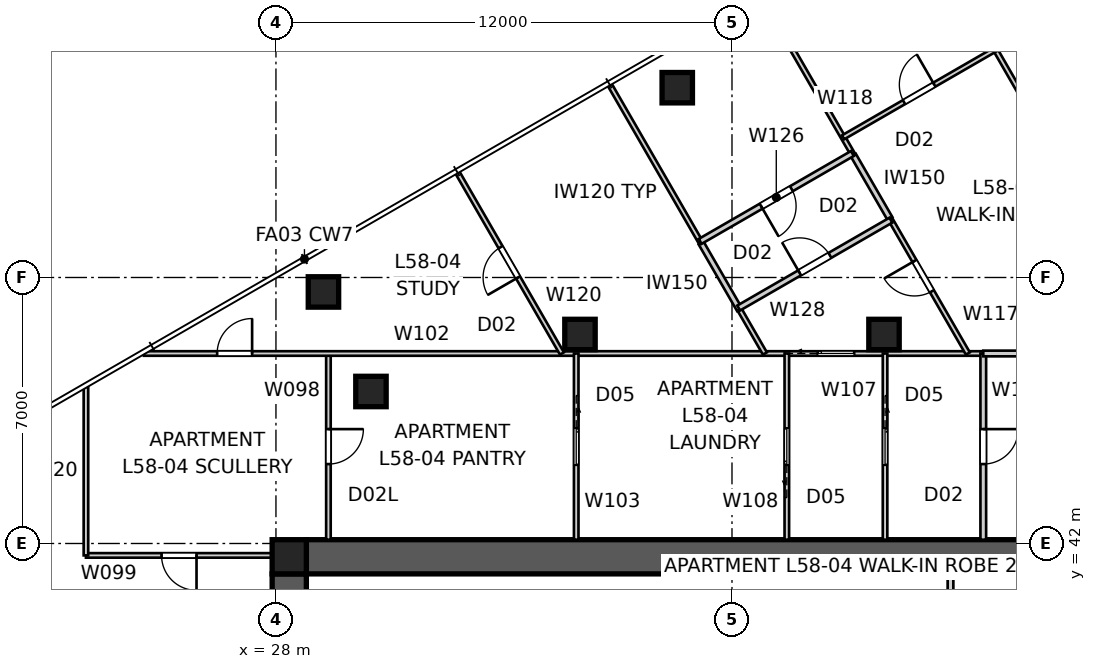
"""IFC4 building model, lengths in metres.
Left out: names, types, materials, properties, quantities, classifications, styles, units other than length and angle.
Written with IfcOpenShell. Run it as: python <this file> out.ifc"""

import sys

from ifc_helpers import new_model, si_unit, direction, frame, frame_2d, origin, origin_2d, place, context, subcontext, project, spatial, polyline, rectangle, outline, extrude, element, fill, save


model = new_model("IFC4")
c1 = context("Model", 3, precision=1e-05, world=origin(), true_north=direction((0.0, 1.0)))
c2 = subcontext(c1, "Body", "Model", "MODEL_VIEW")
j1 = project(units=[si_unit("LENGTHUNIT", "METRE"), si_unit("PLANEANGLEUNIT", "RADIAN")], contexts=[c1])
p1 = place(None, origin())
s1 = spatial("IfcSite", under=j1, at=p1, CompositionType="ELEMENT")
p2 = place(p1, origin())
s2 = spatial("IfcBuilding", under=s1, at=p2, CompositionType="ELEMENT")
p3 = place(p2, frame((0.0, 0.0, 211.6)))
s3 = spatial("IfcBuildingStorey", under=s2, at=p3, CompositionType="ELEMENT", Elevation=211.6)
p4 = place(p3, frame((28.8, 41.65, 0.0), z_axis=(0.0, 0.0, 1.0), x_axis=(1.0, 0.0, 0.0)))
e1 = element("IfcWall", 1, at=p4, inside=s3, PredefinedType="SHEAR", context=c2, shape_type="SweptSolid", body=[
    extrude(outline(polyline([(0.0, -0.45), (22.4, -0.45), (22.4, -0.025), (22.85, -0.025), (22.85, 0.025), (22.4, 0.025), (22.4, 0.45), (0.0, 0.45), (0.0, 0.025), (-0.45, 0.025), (-0.45, -0.025), (0.0, -0.025), (0.0, -0.45)])), origin(), (0.0, 0.0, 1.0), 3.4),
])
p5 = place(p3, frame((28.35, 41.2, 0.0), z_axis=(0.0, 0.0, 1.0), x_axis=(0.0, -1.0, 0.0)))
e2 = element("IfcWall", 2, at=p5, inside=s3, PredefinedType="SHEAR", context=c2, shape_type="SweptSolid", body=[
    extrude(outline(polyline([(0.0, -0.45), (22.4, -0.45), (22.4, -0.025), (22.85, -0.025), (22.85, 0.025), (22.4, 0.025), (22.4, 0.45), (0.0, 0.45), (0.0, 0.025), (-0.45, 0.025), (-0.45, -0.025), (0.0, -0.025), (0.0, -0.45)])), origin(), (0.0, 0.0, 1.0), 3.4),
])
p6 = place(p5, frame((11.14, 0.0, 0.0)))
e3 = element("IfcOpeningElement", 3, at=p6, cuts=e2, PredefinedType="OPENING", context=c2, shape_type="SweptSolid", body=[
    extrude(rectangle(XDim=1.02, YDim=2.4, at=frame_2d((0.51, 1.2))), frame((0.0, 0.46, 0.0), z_axis=(0.0, -1.0, 0.0), x_axis=(1.0, 0.0, 0.0)), (0.0, 0.0, 1.0), 0.92),
])
p7 = place(p3, frame((28.35, 41.65, 0.0), z_axis=(0.0, 0.0, 1.0), x_axis=(1.0, 0.0, 0.0)))
e4 = element("IfcColumn", 4, at=p7, inside=s3, PredefinedType="COLUMN", context=c2, shape_type="SweptSolid", body=[
    extrude(rectangle(XDim=0.9, YDim=0.9, at=origin_2d()), origin(), (0.0, 0.0, 1.0), 3.4),
])
for number, where, z_axis, x_axis in (
    (5, (38.56, 53.995, 0.0), (0.0, 0.0, 1.0), (1.0, 0.0, 0.0)),
    (6, (29.25, 48.62, 0.0), (0.0, 0.0, 1.0), (1.0, 0.0, 0.0)),
    (7, (44.0, 47.5, 0.0), (0.0, 0.0, 1.0), (1.0, 0.0, 0.0)),
    (8, (36.0, 47.5, 0.0), (0.0, 0.0, 1.0), (1.0, 0.0, 0.0)),
    (9, (30.5, 46.0, 0.0), (0.0, 0.0, 1.0), (1.0, 0.0, 0.0)),
):
    element("IfcColumn", number, at=place(p3, frame(where, z_axis=z_axis, x_axis=x_axis)), inside=s3, PredefinedType="COLUMN", context=c2, shape_type="SweptSolid", body=[
        extrude(rectangle(XDim=0.8, YDim=0.8, at=origin_2d()), origin(), (0.0, 0.0, 1.0), 3.4),
    ])
p8 = place(p3, frame((45.75, 41.2, 0.0), z_axis=(0.0, 0.0, 1.0), x_axis=(0.0, -1.0, 0.0)))
e10 = element("IfcWall", 10, at=p8, inside=s3, PredefinedType="SOLIDWALL", context=c2, shape_type="SweptSolid", body=[
    extrude(rectangle(XDim=5.9, YDim=0.15, at=frame_2d((2.95, 0.0))), origin(), (0.0, 0.0, 1.0), 3.25),
])
p9 = place(p3, frame((29.381, 47.0, 0.0), z_axis=(0.0, 0.0, 1.0), x_axis=(0.0, -1.0, 0.0)))
e11 = element("IfcWall", 11, at=p9, inside=s3, PredefinedType="PARTITIONING", context=c2, shape_type="SweptSolid", body=[
    extrude(rectangle(XDim=4.9, YDim=0.12, at=frame_2d((2.45, 0.0))), origin(), (0.0, 0.0, 1.0), 3.25),
])
p10 = place(p9, frame((1.99, 0.0, 0.0)))
e12 = element("IfcOpeningElement", 12, at=p10, cuts=e11, PredefinedType="OPENING", context=c2, shape_type="SweptSolid", body=[
    extrude(rectangle(XDim=0.92, YDim=2.1, at=frame_2d((0.46, 1.05))), frame((0.0, 0.07, 0.0), z_axis=(0.0, -1.0, 0.0), x_axis=(1.0, 0.0, 0.0)), (0.0, 0.0, 1.0), 0.14),
])
p11 = place(p3, frame((27.9, 41.687, 0.0), z_axis=(0.0, 0.0, 1.0), x_axis=(-1.0, 0.0, 0.0)))
e13 = element("IfcWall", 13, at=p11, inside=s3, PredefinedType="PARTITIONING", context=c2, shape_type="SweptSolid", body=[
    extrude(rectangle(XDim=4.9, YDim=0.12, at=frame_2d((2.45, 0.0))), origin(), (0.0, 0.0, 1.0), 3.25),
])
p12 = place(p11, frame((1.99, 0.0, 0.0)))
e14 = element("IfcOpeningElement", 14, at=p12, cuts=e13, PredefinedType="OPENING", context=c2, shape_type="SweptSolid", body=[
    extrude(rectangle(XDim=0.92, YDim=2.1, at=frame_2d((0.46, 1.05))), frame((0.0, 0.07, 0.0), z_axis=(0.0, -1.0, 0.0), x_axis=(1.0, 0.0, 0.0)), (0.0, 0.0, 1.0), 0.14),
])
p13 = place(p3, frame((23.0, 41.687, 0.0), z_axis=(0.0, 0.0, 1.0), x_axis=(0.0, 1.0, 0.0)))
e15 = element("IfcWall", 15, at=p13, inside=s3, PredefinedType="PARTITIONING", context=c2, shape_type="SweptSolid", body=[
    extrude(rectangle(XDim=4.433, YDim=0.12, at=frame_2d((2.216, 0.0))), origin(), (0.0, 0.0, 1.0), 3.25),
])
p14 = place(p3, frame((24.525, 47.0, 0.0), z_axis=(0.0, 0.0, 1.0), x_axis=(1.0, 0.0, 0.0)))
e16 = element("IfcWall", 16, at=p14, inside=s3, PredefinedType="PARTITIONING", context=c2, shape_type="SweptSolid", body=[
    extrude(rectangle(XDim=22.087, YDim=0.12, at=frame_2d((11.044, 0.0))), origin(), (0.0, 0.0, 1.0), 2.55),
])
p15 = place(p14, frame((1.928, 0.0, 0.0)))
e17 = element("IfcOpeningElement", 17, at=p15, cuts=e16, PredefinedType="OPENING", context=c2, shape_type="SweptSolid", body=[
    extrude(rectangle(XDim=0.92, YDim=2.34, at=frame_2d((0.46, 1.17))), frame((0.0, 0.07, 0.0), z_axis=(0.0, -1.0, 0.0), x_axis=(1.0, 0.0, 0.0)), (0.0, 0.0, 1.0), 0.14),
])
p16 = place(p14, frame((17.73, 0.0, 0.0)))
e18 = element("IfcOpeningElement", 18, at=p16, cuts=e16, PredefinedType="OPENING", context=c2, shape_type="SweptSolid", body=[
    extrude(rectangle(XDim=0.96, YDim=2.1, at=frame_2d((0.48, 1.05))), frame((0.0, 0.07, 0.0), z_axis=(0.0, -1.0, 0.0), x_axis=(1.0, 0.0, 0.0)), (0.0, 0.0, 1.0), 0.14),
])
p17 = place(p3, frame((35.901, 47.0, 0.0), z_axis=(0.0, 0.0, 1.0), x_axis=(0.0, -1.0, 0.0)))
e19 = element("IfcWall", 19, at=p17, inside=s3, PredefinedType="PARTITIONING", context=c2, shape_type="SweptSolid", body=[
    extrude(rectangle(XDim=4.9, YDim=0.12, at=frame_2d((2.45, 0.0))), origin(), (0.0, 0.0, 1.0), 3.25),
])
p18 = place(p17, frame((1.97, 0.0, 0.0)))
e20 = element("IfcOpeningElement", 20, at=p18, cuts=e19, PredefinedType="OPENING", context=c2, shape_type="SweptSolid", body=[
    extrude(rectangle(XDim=0.96, YDim=2.1, at=frame_2d((0.48, 1.05))), frame((0.0, 0.07, 0.0), z_axis=(0.0, -1.0, 0.0), x_axis=(1.0, 0.0, 0.0)), (0.0, 0.0, 1.0), 0.14),
])
p19 = place(p3, frame((44.028, 47.0, 0.0), z_axis=(0.0, 0.0, 1.0), x_axis=(0.0, -1.0, 0.0)))
e21 = element("IfcWall", 21, at=p19, inside=s3, PredefinedType="PARTITIONING", context=c2, shape_type="SweptSolid", body=[
    extrude(rectangle(XDim=4.9, YDim=0.12, at=frame_2d((2.45, 0.0))), origin(), (0.0, 0.0, 1.0), 3.25),
])
p20 = place(p19, frame((1.97, 0.0, 0.0)))
e22 = element("IfcOpeningElement", 22, at=p20, cuts=e21, PredefinedType="OPENING", context=c2, shape_type="SweptSolid", body=[
    extrude(rectangle(XDim=0.96, YDim=2.1, at=frame_2d((0.48, 1.05))), frame((0.0, 0.07, 0.0), z_axis=(0.0, -1.0, 0.0), x_axis=(1.0, 0.0, 0.0)), (0.0, 0.0, 1.0), 0.14),
])
p21 = place(p3, frame((41.443, 42.1, 0.0), z_axis=(0.0, 0.0, 1.0), x_axis=(0.0, 1.0, 0.0)))
e23 = element("IfcWall", 23, at=p21, inside=s3, PredefinedType="PARTITIONING", context=c2, shape_type="SweptSolid", body=[
    extrude(rectangle(XDim=4.9, YDim=0.12, at=frame_2d((2.45, 0.0))), origin(), (0.0, 0.0, 1.0), 3.25),
])
p22 = place(p21, frame((1.97, 0.0, 0.0)))
e24 = element("IfcOpeningElement", 24, at=p22, cuts=e23, PredefinedType="OPENING", context=c2, shape_type="SweptSolid", body=[
    extrude(rectangle(XDim=0.96, YDim=2.1, at=frame_2d((0.48, 1.05))), frame((0.0, 0.07, 0.0), z_axis=(0.0, -1.0, 0.0), x_axis=(1.0, 0.0, 0.0)), (0.0, 0.0, 1.0), 0.14),
])
p23 = place(p3, frame((46.612, 47.0, 0.0), z_axis=(0.0, 0.0, 1.0), x_axis=(0.0, -1.0, 0.0)))
e25 = element("IfcWall", 25, at=p23, inside=s3, PredefinedType="SOLIDWALL", context=c2, shape_type="SweptSolid", body=[
    extrude(rectangle(XDim=4.9, YDim=0.15, at=frame_2d((2.45, 0.0))), origin(), (0.0, 0.0, 1.0), 3.25),
])
p24 = place(p23, frame((1.99, 0.0, 0.0)))
e26 = element("IfcOpeningElement", 26, at=p24, cuts=e25, PredefinedType="OPENING", context=c2, shape_type="SweptSolid", body=[
    extrude(rectangle(XDim=0.92, YDim=2.34, at=frame_2d((0.46, 1.17))), frame((0.0, 0.085, 0.0), z_axis=(0.0, -1.0, 0.0), x_axis=(1.0, 0.0, 0.0)), (0.0, 0.0, 1.0), 0.17),
])
p25 = place(p3, frame((46.612, 47.0, 0.0), z_axis=(0.0, 0.0, 1.0), x_axis=(1.0, 0.0, 0.0)))
e27 = element("IfcWall", 27, at=p25, inside=s3, PredefinedType="SOLIDWALL", context=c2, shape_type="SweptSolid", body=[
    extrude(rectangle(XDim=2.585, YDim=0.15, at=frame_2d((1.292, 0.0))), origin(), (0.0, 0.0, 1.0), 3.25),
])
p26 = place(p3, frame((43.193, 52.219, 0.0), z_axis=(0.0, 0.0, 1.0), x_axis=(-0.50000634465, 0.866021740668, 0.0)))
e28 = element("IfcWall", 28, at=p26, inside=s3, PredefinedType="PARTITIONING", context=c2, shape_type="SweptSolid", body=[
    extrude(rectangle(XDim=4.814, YDim=0.12, at=frame_2d((2.407, 0.0))), origin(), (0.0, 0.0, 1.0), 3.25),
])
p27 = place(p3, frame((46.792, 55.237, 0.0), z_axis=(0.0, 0.0, 1.0), x_axis=(0.49923620881, -0.866465929978, 0.0)))
e29 = element("IfcWall", 29, at=p27, inside=s3, PredefinedType="PARTITIONING", context=c2, shape_type="SweptSolid", body=[
    extrude(rectangle(XDim=9.506, YDim=0.12, at=frame_2d((4.753, 0.0))), origin(), (0.0, 0.0, 1.0), 3.25),
])
p28 = place(p27, frame((6.586, 0.0, 0.0)))
e30 = element("IfcOpeningElement", 30, at=p28, cuts=e29, PredefinedType="OPENING", context=c2, shape_type="SweptSolid", body=[
    extrude(rectangle(XDim=0.92, YDim=2.34, at=frame_2d((0.46, 1.17))), frame((0.0, 0.07, 0.0), z_axis=(0.0, -1.0, 0.0), x_axis=(1.0, 0.0, 0.0)), (0.0, 0.0, 1.0), 0.14),
])
p29 = place(p27, frame((1.969, 0.0, 0.0)))
e31 = element("IfcOpeningElement", 31, at=p29, cuts=e29, PredefinedType="OPENING", context=c2, shape_type="SweptSolid", body=[
    extrude(rectangle(XDim=0.92, YDim=2.34, at=frame_2d((0.46, 1.17))), frame((0.0, 0.07, 0.0), z_axis=(0.0, -1.0, 0.0), x_axis=(1.0, 0.0, 0.0)), (0.0, 0.0, 1.0), 0.14),
])
p30 = place(p3, frame((46.207, 47.0, 0.0), z_axis=(0.0, 0.0, 1.0), x_axis=(-0.499986975689, 0.866032923243, 0.0)))
e32 = element("IfcWall", 32, at=p30, inside=s3, PredefinedType="PARTITIONING", context=c2, shape_type="SweptSolid", body=[
    extrude(rectangle(XDim=4.101, YDim=0.12, at=frame_2d((2.051, 0.0))), origin(), (0.0, 0.0, 1.0), 3.25),
])
p31 = place(p30, frame((1.891, 0.0, 0.0)))
e33 = element("IfcOpeningElement", 33, at=p31, cuts=e32, PredefinedType="OPENING", context=c2, shape_type="SweptSolid", body=[
    extrude(rectangle(XDim=0.92, YDim=2.34, at=frame_2d((0.46, 1.17))), frame((0.0, 0.07, 0.0), z_axis=(0.0, -1.0, 0.0), x_axis=(1.0, 0.0, 0.0)), (0.0, 0.0, 1.0), 0.14),
])
p32 = place(p3, frame((42.922, 52.688, 0.0), z_axis=(0.0, 0.0, 1.0), x_axis=(0.866025598446, 0.499999662836, 0.0)))
e34 = element("IfcWall", 34, at=p32, inside=s3, PredefinedType="PARTITIONING", context=c2, shape_type="SweptSolid", body=[
    extrude(rectangle(XDim=4.625, YDim=0.12, at=frame_2d((2.312, 0.0))), origin(), (0.0, 0.0, 1.0), 3.25),
])
p33 = place(p32, frame((1.853, 0.0, 0.0)))
e35 = element("IfcOpeningElement", 35, at=p33, cuts=e34, PredefinedType="OPENING", context=c2, shape_type="SweptSolid", body=[
    extrude(rectangle(XDim=0.92, YDim=2.34, at=frame_2d((0.46, 1.17))), frame((0.0, 0.07, 0.0), z_axis=(0.0, -1.0, 0.0), x_axis=(1.0, 0.0, 0.0)), (0.0, 0.0, 1.0), 0.14),
])
p34 = place(p3, frame((44.156, 50.552, 0.0), z_axis=(0.0, 0.0, 1.0), x_axis=(-0.50001143954, 0.866018799062, 0.0)))
e36 = element("IfcWall", 36, at=p34, inside=s3, PredefinedType="SOLIDWALL", context=c2, shape_type="SweptSolid", body=[
    extrude(rectangle(XDim=1.926, YDim=0.15, at=frame_2d((0.963, 0.0))), origin(), (0.0, 0.0, 1.0), 3.25),
])
p35 = place(p3, frame((35.526, 47.0, 0.0), z_axis=(0.0, 0.0, 1.0), x_axis=(-0.500010615962, 0.866019274569, 0.0)))
e37 = element("IfcWall", 37, at=p35, inside=s3, PredefinedType="PARTITIONING", context=c2, shape_type="SweptSolid", body=[
    extrude(rectangle(XDim=5.5, YDim=0.12, at=frame_2d((2.75, 0.0))), origin(), (0.0, 0.0, 1.0), 3.25),
])
p36 = place(p35, frame((2.31, 0.0, 0.0)))
e38 = element("IfcOpeningElement", 38, at=p36, cuts=e37, PredefinedType="OPENING", context=c2, shape_type="SweptSolid", body=[
    extrude(rectangle(XDim=0.92, YDim=2.34, at=frame_2d((0.46, 1.17))), frame((0.0, 0.07, 0.0), z_axis=(0.0, -1.0, 0.0), x_axis=(1.0, 0.0, 0.0)), (0.0, 0.0, 1.0), 0.14),
])
p37 = place(p3, frame((36.781, 54.076, 0.0), z_axis=(0.0, 0.0, 1.0), x_axis=(0.50000634465, -0.866021740668, 0.0)))
e39 = element("IfcWall", 39, at=p37, inside=s3, PredefinedType="PARTITIONING", context=c2, shape_type="SweptSolid", body=[
    extrude(rectangle(XDim=4.814, YDim=0.12, at=frame_2d((2.407, 0.0))), origin(), (0.0, 0.0, 1.0), 3.25),
])
p38 = place(p3, frame((40.2, 48.153, 0.0), z_axis=(0.0, 0.0, 1.0), x_axis=(0.500045314201, -0.865999240038, 0.0)))
e40 = element("IfcWall", 40, at=p38, inside=s3, PredefinedType="PARTITIONING", context=c2, shape_type="SweptSolid", body=[
    extrude(rectangle(XDim=1.331, YDim=0.12, at=frame_2d((0.666, 0.0))), origin(), (0.0, 0.0, 1.0), 3.25),
])
p39 = place(p3, frame((39.188, 49.907, 0.0), z_axis=(0.0, 0.0, 1.0), x_axis=(0.499924156672, -0.866069187523, 0.0)))
e41 = element("IfcWall", 41, at=p39, inside=s3, PredefinedType="SOLIDWALL", context=c2, shape_type="SweptSolid", body=[
    extrude(rectangle(XDim=2.026, YDim=0.15, at=frame_2d((1.013, 0.0))), origin(), (0.0, 0.0, 1.0), 3.25),
])
p40 = place(p3, frame((43.168, 52.263, 0.0), z_axis=(0.0, 0.0, 1.0), x_axis=(-0.866025598446, -0.499999662836, 0.0)))
e42 = element("IfcWall", 42, at=p40, inside=s3, PredefinedType="SOLIDWALL", context=c2, shape_type="SweptSolid", body=[
    extrude(rectangle(XDim=4.625, YDim=0.15, at=frame_2d((2.312, 0.0))), origin(), (0.0, 0.0, 1.0), 3.25),
])
p41 = place(p40, frame((1.853, 0.0, 0.0)))
e43 = element("IfcOpeningElement", 43, at=p41, cuts=e42, PredefinedType="OPENING", context=c2, shape_type="SweptSolid", body=[
    extrude(rectangle(XDim=0.92, YDim=2.34, at=frame_2d((0.46, 1.17))), frame((0.0, 0.085, 0.0), z_axis=(0.0, -1.0, 0.0), x_axis=(1.0, 0.0, 0.0)), (0.0, 0.0, 1.0), 0.17),
])
p42 = place(p3, frame((40.176, 48.196, 0.0), z_axis=(0.0, 0.0, 1.0), x_axis=(0.866025598446, 0.499999662836, 0.0)))
e44 = element("IfcWall", 44, at=p42, inside=s3, PredefinedType="SOLIDWALL", context=c2, shape_type="SweptSolid", body=[
    extrude(rectangle(XDim=4.625, YDim=0.15, at=frame_2d((2.312, 0.0))), origin(), (0.0, 0.0, 1.0), 3.25),
])
p43 = place(p42, frame((1.853, 0.0, 0.0)))
e45 = element("IfcOpeningElement", 45, at=p43, cuts=e44, PredefinedType="OPENING", context=c2, shape_type="SweptSolid", body=[
    extrude(rectangle(XDim=0.92, YDim=2.34, at=frame_2d((0.46, 1.17))), frame((0.0, 0.085, 0.0), z_axis=(0.0, -1.0, 0.0), x_axis=(1.0, 0.0, 0.0)), (0.0, 0.0, 1.0), 0.17),
])
p44 = place(p3, frame((27.9, 41.687, 0.0), z_axis=(0.0, 0.0, 1.0), x_axis=(0.999162409553, -0.040920402453, 0.0)))
e46 = element("IfcWall", 46, at=p44, inside=s3, PredefinedType="PARTITIONING", context=c2, shape_type="SweptSolid", body=[
    extrude(rectangle(XDim=0.901, YDim=0.12, at=frame_2d((0.45, 0.0))), origin(), (0.0, 0.0, 1.0), 3.25),
])
p45 = place(p12, origin())
e47 = element("IfcDoor", 47, at=p45, inside=s3, OperationType="SINGLE_SWING_LEFT", PredefinedType="DOOR", context=c2, shape_type="SweptSolid", body=[
    extrude(rectangle(XDim=0.92, YDim=2.1, at=frame_2d((0.46, 1.05))), frame((0.0, 0.025, 0.0), z_axis=(0.0, -1.0, 0.0), x_axis=(1.0, 0.0, 0.0)), (0.0, 0.0, 1.0), 0.05),
])
fill(e14, e47)
p46 = place(p15, origin())
e48 = element("IfcDoor", 48, at=p46, inside=s3, OperationType="SINGLE_SWING_RIGHT", PredefinedType="DOOR", context=c2, shape_type="SweptSolid", body=[
    extrude(rectangle(XDim=0.92, YDim=2.34, at=frame_2d((0.46, 1.17))), frame((0.0, 0.025, 0.0), z_axis=(0.0, -1.0, 0.0), x_axis=(1.0, 0.0, 0.0)), (0.0, 0.0, 1.0), 0.05),
])
fill(e17, e48)
p47 = place(p10, origin())
e49 = element("IfcDoor", 49, at=p47, inside=s3, OperationType="SINGLE_SWING_LEFT", PredefinedType="DOOR", context=c2, shape_type="SweptSolid", body=[
    extrude(rectangle(XDim=0.92, YDim=2.1, at=frame_2d((0.46, 1.05))), frame((0.0, 0.025, 0.0), z_axis=(0.0, -1.0, 0.0), x_axis=(1.0, 0.0, 0.0)), (0.0, 0.0, 1.0), 0.05),
])
fill(e12, e49)
p48 = place(p36, origin())
e50 = element("IfcDoor", 50, at=p48, inside=s3, OperationType="SINGLE_SWING_LEFT", PredefinedType="DOOR", context=c2, shape_type="SweptSolid", body=[
    extrude(rectangle(XDim=0.92, YDim=2.34, at=frame_2d((0.46, 1.17))), frame((0.0, 0.025, 0.0), z_axis=(0.0, -1.0, 0.0), x_axis=(1.0, 0.0, 0.0)), (0.0, 0.0, 1.0), 0.05),
])
fill(e38, e50)
p49 = place(p18, origin())
e51 = element("IfcDoor", 51, at=p49, inside=s3, OperationType="SLIDING_TO_LEFT", PredefinedType="DOOR", context=c2, shape_type="SweptSolid", body=[
    extrude(rectangle(XDim=0.96, YDim=2.1, at=frame_2d((0.48, 1.05))), frame((0.0, 0.025, 0.0), z_axis=(0.0, -1.0, 0.0), x_axis=(1.0, 0.0, 0.0)), (0.0, 0.0, 1.0), 0.05),
])
fill(e20, e51)
p50 = place(p22, origin())
e52 = element("IfcDoor", 52, at=p50, inside=s3, OperationType="SLIDING_TO_LEFT", PredefinedType="DOOR", context=c2, shape_type="SweptSolid", body=[
    extrude(rectangle(XDim=0.96, YDim=2.1, at=frame_2d((0.48, 1.05))), frame((0.0, 0.025, 0.0), z_axis=(0.0, -1.0, 0.0), x_axis=(1.0, 0.0, 0.0)), (0.0, 0.0, 1.0), 0.05),
])
fill(e24, e52)
p51 = place(p20, origin())
e53 = element("IfcDoor", 53, at=p51, inside=s3, OperationType="SLIDING_TO_LEFT", PredefinedType="DOOR", context=c2, shape_type="SweptSolid", body=[
    extrude(rectangle(XDim=0.96, YDim=2.1, at=frame_2d((0.48, 1.05))), frame((0.0, 0.025, 0.0), z_axis=(0.0, -1.0, 0.0), x_axis=(1.0, 0.0, 0.0)), (0.0, 0.0, 1.0), 0.05),
])
fill(e22, e53)
p52 = place(p16, origin())
e54 = element("IfcDoor", 54, at=p52, inside=s3, OperationType="SLIDING_TO_LEFT", PredefinedType="DOOR", context=c2, shape_type="SweptSolid", body=[
    extrude(rectangle(XDim=0.96, YDim=2.1, at=frame_2d((0.48, 1.05))), frame((0.0, 0.025, 0.0), z_axis=(0.0, -1.0, 0.0), x_axis=(1.0, 0.0, 0.0)), (0.0, 0.0, 1.0), 0.05),
])
fill(e18, e54)
p53 = place(p24, origin())
e55 = element("IfcDoor", 55, at=p53, inside=s3, OperationType="SINGLE_SWING_LEFT", PredefinedType="DOOR", context=c2, shape_type="SweptSolid", body=[
    extrude(rectangle(XDim=0.92, YDim=2.34, at=frame_2d((0.46, 1.17))), frame((0.0, 0.025, 0.0), z_axis=(0.0, -1.0, 0.0), x_axis=(1.0, 0.0, 0.0)), (0.0, 0.0, 1.0), 0.05),
])
fill(e26, e55)
p54 = place(p43, origin())
e56 = element("IfcDoor", 56, at=p54, inside=s3, OperationType="SINGLE_SWING_LEFT", PredefinedType="DOOR", context=c2, shape_type="SweptSolid", body=[
    extrude(rectangle(XDim=0.92, YDim=2.34, at=frame_2d((0.46, 1.17))), frame((0.0, 0.025, 0.0), z_axis=(0.0, -1.0, 0.0), x_axis=(1.0, 0.0, 0.0)), (0.0, 0.0, 1.0), 0.05),
])
fill(e45, e56)
p55 = place(p31, origin())
e57 = element("IfcDoor", 57, at=p55, inside=s3, OperationType="SINGLE_SWING_RIGHT", PredefinedType="DOOR", context=c2, shape_type="SweptSolid", body=[
    extrude(rectangle(XDim=0.92, YDim=2.34, at=frame_2d((0.46, 1.17))), frame((0.0, 0.025, 0.0), z_axis=(0.0, -1.0, 0.0), x_axis=(1.0, 0.0, 0.0)), (0.0, 0.0, 1.0), 0.05),
])
fill(e33, e57)
p56 = place(p41, origin())
e58 = element("IfcDoor", 58, at=p56, inside=s3, OperationType="SINGLE_SWING_RIGHT", PredefinedType="DOOR", context=c2, shape_type="SweptSolid", body=[
    extrude(rectangle(XDim=0.92, YDim=2.34, at=frame_2d((0.46, 1.17))), frame((0.0, 0.025, 0.0), z_axis=(0.0, -1.0, 0.0), x_axis=(1.0, 0.0, 0.0)), (0.0, 0.0, 1.0), 0.05),
])
fill(e43, e58)
p57 = place(p33, origin())
e59 = element("IfcDoor", 59, at=p57, inside=s3, OperationType="SINGLE_SWING_RIGHT", PredefinedType="DOOR", context=c2, shape_type="SweptSolid", body=[
    extrude(rectangle(XDim=0.92, YDim=2.34, at=frame_2d((0.46, 1.17))), frame((0.0, 0.025, 0.0), z_axis=(0.0, -1.0, 0.0), x_axis=(1.0, 0.0, 0.0)), (0.0, 0.0, 1.0), 0.05),
])
fill(e35, e59)
save(model, sys.argv[1])
